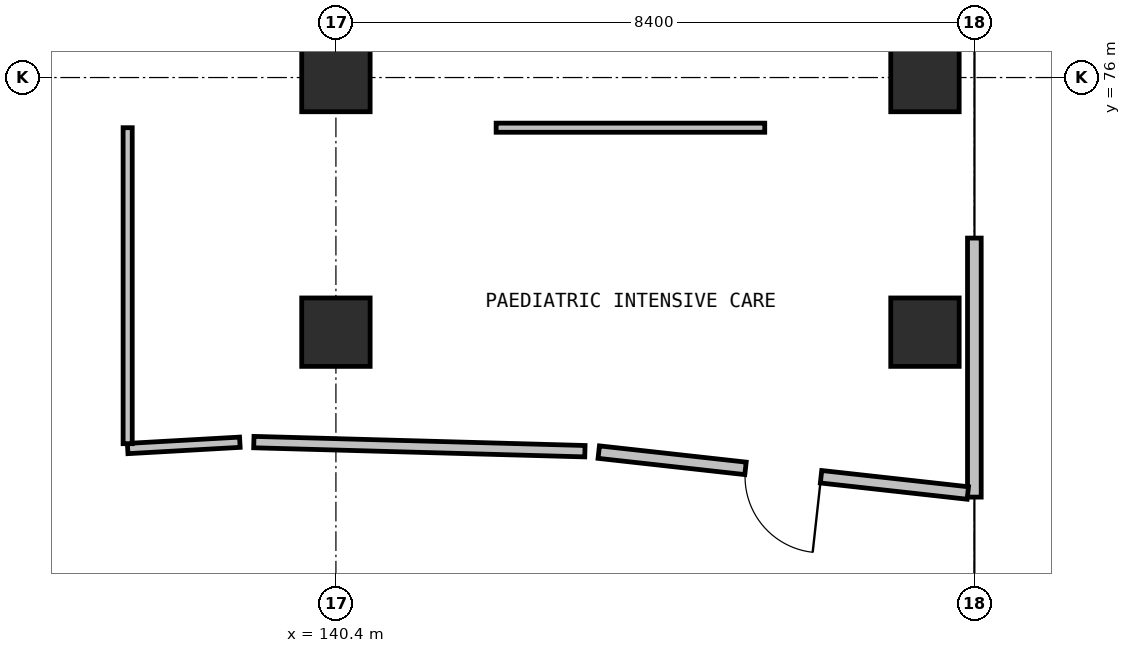
"""IFC4 building model, lengths in metres.
Left out: names, types, materials, properties, quantities, classifications, styles, units other than length and angle.
Written with IfcOpenShell. Run it as: python <this file> out.ifc"""

import sys

from ifc_helpers import new_model, si_unit, direction, frame, frame_2d, origin, origin_2d, place, context, subcontext, project, spatial, rectangle, extrude, element, fill, save


model = new_model("IFC4")
c1 = context("Model", 3, precision=1e-05, world=origin(), true_north=direction((0.0, 1.0)))
c2 = subcontext(c1, "Body", "Model", "MODEL_VIEW")
j1 = project(units=[si_unit("LENGTHUNIT", "METRE"), si_unit("PLANEANGLEUNIT", "RADIAN")], contexts=[c1])
p1 = place(None, origin())
s1 = spatial("IfcSite", under=j1, at=p1, CompositionType="ELEMENT")
p2 = place(p1, origin())
s2 = spatial("IfcBuilding", under=s1, at=p2, CompositionType="ELEMENT")
p3 = place(p2, frame((0.0, 0.0, 5.4)))
s3 = spatial("IfcBuildingStorey", under=s2, at=p3, CompositionType="ELEMENT", Elevation=5.4)
for number, where, z_axis, x_axis in (
    (1, (140.4, 72.65, 0.0), (0.0, 0.0, 1.0), (1.0, 0.0, 0.0)),
    (2, (140.4, 76.0, 0.0), (0.0, 0.0, 1.0), (1.0, 0.0, 0.0)),
    (3, (148.15, 72.65, 0.0), (0.0, 0.0, 1.0), (1.0, 0.0, 0.0)),
    (4, (148.15, 76.0, 0.0), (0.0, 0.0, 1.0), (1.0, 0.0, 0.0)),
):
    element("IfcColumn", number, at=place(p3, frame(where, z_axis=z_axis, x_axis=x_axis)), inside=s3, PredefinedType="COLUMN", context=c2, shape_type="SweptSolid", body=[
        extrude(rectangle(XDim=0.9, YDim=0.9, at=origin_2d()), origin(), (0.0, 0.0, 1.0), 4.8),
    ])
p4 = place(p3, frame((142.508, 75.34, 0.0), z_axis=(0.0, 0.0, 1.0), x_axis=(1.0, 0.0, 0.0)))
e5 = element("IfcWall", 5, at=p4, inside=s3, PredefinedType="PARTITIONING", context=c2, shape_type="SweptSolid", body=[
    extrude(rectangle(XDim=3.534, YDim=0.12, at=frame_2d((1.767, 0.0))), origin(), (0.0, 0.0, 1.0), 4.445),
])
p5 = place(p3, frame((148.8, 73.888, 0.0), z_axis=(0.0, 0.0, 1.0), x_axis=(0.0, -1.0, 0.0)))
e6 = element("IfcWall", 6, at=p5, inside=s3, PredefinedType="PARTITIONING", context=c2, shape_type="SweptSolid", body=[
    extrude(rectangle(XDim=3.408, YDim=0.18, at=frame_2d((1.704, 0.0))), origin(), (0.0, 0.0, 1.0), 4.445),
])
p6 = place(p3, frame((148.714, 70.534, 0.0), z_axis=(0.0, 0.0, 1.0), x_axis=(-0.993917204148, 0.110129883764, 0.0)))
e7 = element("IfcWall", 7, at=p6, inside=s3, PredefinedType="PARTITIONING", context=c2, shape_type="SweptSolid", body=[
    extrude(rectangle(XDim=4.886, YDim=0.165, at=frame_2d((2.443, 0.0))), origin(), (0.0, 0.0, 1.0), 4.445),
])
p7 = place(p6, frame((1.943, 0.0, 0.0)))
e8 = element("IfcOpeningElement", 8, at=p7, cuts=e7, PredefinedType="OPENING", context=c2, shape_type="SweptSolid", body=[
    extrude(rectangle(XDim=1.0, YDim=2.15, at=frame_2d((0.5, 1.075))), frame((0.0, 0.093, 0.0), z_axis=(0.0, -1.0, 0.0), x_axis=(1.0, 0.0, 0.0)), (0.0, 0.0, 1.0), 0.185),
])
p8 = place(p3, frame((143.676, 71.084, 0.0), z_axis=(0.0, 0.0, 1.0), x_axis=(-0.999620015792, 0.027564905715, 0.0)))
e9 = element("IfcWall", 9, at=p8, inside=s3, PredefinedType="PARTITIONING", context=c2, shape_type="SweptSolid", body=[
    extrude(rectangle(XDim=4.358, YDim=0.15, at=frame_2d((2.179, 0.0))), origin(), (0.0, 0.0, 1.0), 4.445),
])
p9 = place(p3, frame((139.136, 71.202, 0.0), z_axis=(0.0, 0.0, 1.0), x_axis=(-0.998422523232, -0.056146817383, 0.0)))
e10 = element("IfcWall", 10, at=p9, inside=s3, PredefinedType="PARTITIONING", context=c2, shape_type="SweptSolid", body=[
    extrude(rectangle(XDim=1.479, YDim=0.135, at=frame_2d((0.739, 0.0))), origin(), (0.0, 0.0, 1.0), 4.445),
])
p10 = place(p3, frame((137.66, 71.183, 0.0), z_axis=(0.0, 0.0, 1.0), x_axis=(0.0, 1.0, 0.0)))
e11 = element("IfcWall", 11, at=p10, inside=s3, PredefinedType="PARTITIONING", context=c2, shape_type="SweptSolid", body=[
    extrude(rectangle(XDim=4.157, YDim=0.12, at=frame_2d((2.079, 0.0))), origin(), (0.0, 0.0, 1.0), 4.445),
])
p11 = place(p7, origin())
e12 = element("IfcDoor", 12, at=p11, inside=s3, OperationType="SINGLE_SWING_RIGHT", PredefinedType="DOOR", context=c2, shape_type="SweptSolid", body=[
    extrude(rectangle(XDim=1.0, YDim=2.15, at=frame_2d((0.5, 1.075))), frame((0.0, 0.025, 0.0), z_axis=(0.0, -1.0, 0.0), x_axis=(1.0, 0.0, 0.0)), (0.0, 0.0, 1.0), 0.05),
])
fill(e8, e12)
save(model, sys.argv[1])
